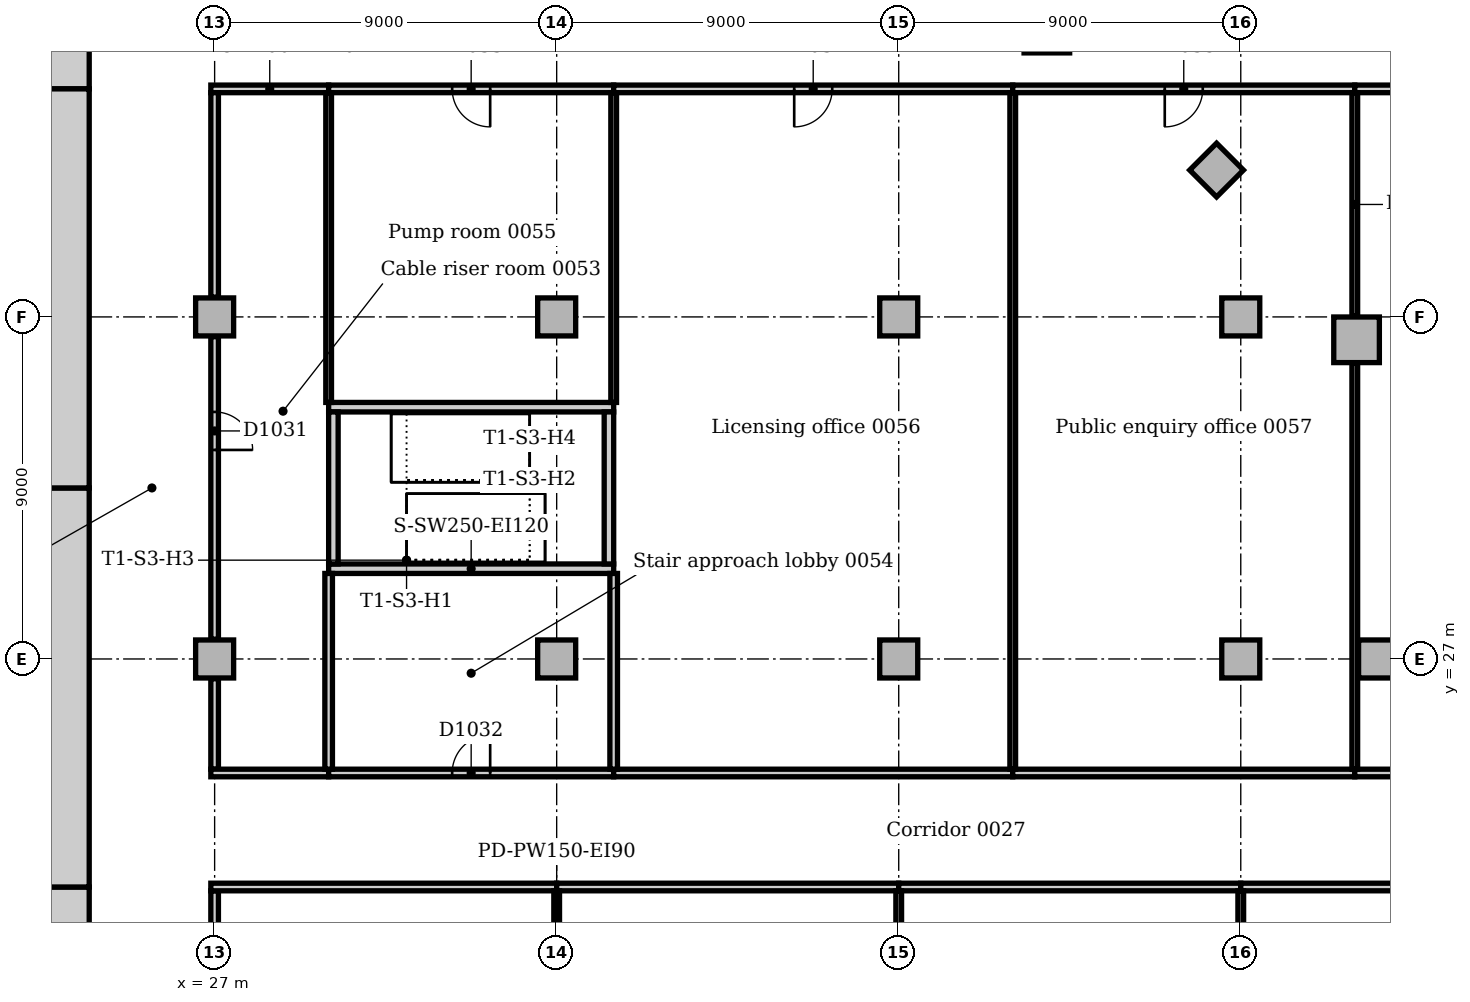
"""IFC4 building model, lengths in metres.
Left out: names, types, materials, properties, quantities, classifications, styles, units other than length and angle.
Written with IfcOpenShell. Run it as: python <this file> out.ifc"""

import sys

from ifc_helpers import new_model, si_unit, direction, frame, frame_2d, origin, origin_2d, place, context, subcontext, project, spatial, rectangle, extrude, element, fill, save


model = new_model("IFC4")
c1 = context("Model", 3, precision=1e-05, world=origin(), true_north=direction((0.0, 1.0)))
c2 = subcontext(c1, "Body", "Model", "MODEL_VIEW")
j1 = project(units=[si_unit("LENGTHUNIT", "METRE"), si_unit("PLANEANGLEUNIT", "RADIAN")], contexts=[c1])
p1 = place(None, origin())
s1 = spatial("IfcSite", under=j1, at=p1, CompositionType="ELEMENT")
p2 = place(p1, origin())
s2 = spatial("IfcBuilding", under=s1, at=p2, CompositionType="ELEMENT")
p3 = place(p2, origin())
s3 = spatial("IfcBuildingStorey", under=s2, at=p3, CompositionType="ELEMENT", Elevation=0.0)
for number, where, z_axis, x_axis in (
    (1, (3.9, 20.4, 0.0), (0.0, 0.0, 1.0), (1.0, 0.0, 0.0)),
    (2, (23.7, 42.6, 0.0), (0.0, 0.0, 1.0), (-1.0, 0.0, 0.0)),
):
    element("IfcWall", number, at=place(p3, frame(where, z_axis=z_axis, x_axis=x_axis)), inside=s3, PredefinedType="SOLIDWALL", context=c2, shape_type="SweptSolid", body=[
        extrude(rectangle(XDim=19.8, YDim=1.2, at=frame_2d((9.9, 0.0))), origin(), (0.0, 0.0, 1.0), 6.0),
    ])
p4 = place(p3, frame((23.1, 21.0, 0.0), z_axis=(0.0, 0.0, 1.0), x_axis=(0.0, 1.0, 0.0)))
e3 = element("IfcWall", 3, at=p4, inside=s3, PredefinedType="SOLIDWALL", context=c2, shape_type="SweptSolid", body=[
    extrude(rectangle(XDim=10.5, YDim=1.2, at=frame_2d((5.25, 0.0))), origin(), (0.0, 0.0, 1.0), 6.0),
])
p5 = place(p4, frame((4.35, 0.0, 0.0)))
e4 = element("IfcOpeningElement", 4, at=p5, cuts=e3, PredefinedType="OPENING", context=c2, shape_type="SweptSolid", body=[
    extrude(rectangle(XDim=1.8, YDim=2.1, at=frame_2d((0.9, 1.05))), frame((0.0, 0.61, 0.0), z_axis=(0.0, -1.0, 0.0), x_axis=(1.0, 0.0, 0.0)), (0.0, 0.0, 1.0), 1.22),
])
p6 = place(p3, frame((23.1, 31.5, 0.0), z_axis=(0.0, 0.0, 1.0), x_axis=(0.0, 1.0, 0.0)))
e5 = element("IfcWall", 5, at=p6, inside=s3, PredefinedType="SOLIDWALL", context=c2, shape_type="SweptSolid", body=[
    extrude(rectangle(XDim=10.5, YDim=1.2, at=frame_2d((5.25, 0.0))), origin(), (0.0, 0.0, 1.0), 6.0),
])
p7 = place(p6, frame((3.15, 0.0, 0.0)))
e6 = element("IfcOpeningElement", 6, at=p7, cuts=e5, PredefinedType="OPENING", context=c2, shape_type="SweptSolid", body=[
    extrude(rectangle(XDim=1.0, YDim=2.1, at=frame_2d((0.5, 1.05))), frame((0.0, 0.61, 0.0), z_axis=(0.0, -1.0, 0.0), x_axis=(1.0, 0.0, 0.0)), (0.0, 0.0, 1.0), 1.22),
])
p8 = place(p6, frame((5.2, 0.0, 0.0)))
e7 = element("IfcOpeningElement", 7, at=p8, cuts=e5, PredefinedType="OPENING", context=c2, shape_type="SweptSolid", body=[
    extrude(rectangle(XDim=1.0, YDim=2.1, at=frame_2d((0.5, 1.05))), frame((0.0, 0.61, 0.0), z_axis=(0.0, -1.0, 0.0), x_axis=(1.0, 0.0, 0.0)), (0.0, 0.0, 1.0), 1.22),
])
for number, where, z_axis, x_axis in (
    (8, (30.0, 29.375, 0.0), (0.0, 0.0, 1.0), (1.0, 0.0, 0.0)),
    (9, (37.5, 33.625, 0.0), (0.0, 0.0, 1.0), (-1.0, 0.0, 0.0)),
):
    element("IfcWall", number, at=place(p3, frame(where, z_axis=z_axis, x_axis=x_axis)), inside=s3, PredefinedType="SOLIDWALL", context=c2, shape_type="SweptSolid", body=[
        extrude(rectangle(XDim=7.5, YDim=0.25, at=frame_2d((3.75, 0.0))), origin(), (0.0, 0.0, 1.0), 6.0),
    ])
for number, where, z_axis, x_axis in (
    (10, (37.375, 29.5, 0.0), (0.0, 0.0, 1.0), (0.0, 1.0, 0.0)),
    (11, (30.125, 33.5, 0.0), (0.0, 0.0, 1.0), (0.0, -1.0, 0.0)),
):
    element("IfcWall", number, at=place(p3, frame(where, z_axis=z_axis, x_axis=x_axis)), inside=s3, PredefinedType="SOLIDWALL", context=c2, shape_type="SweptSolid", body=[
        extrude(rectangle(XDim=4.0, YDim=0.25, at=frame_2d((2.0, 0.0))), origin(), (0.0, 0.0, 1.0), 6.0),
    ])
for number, where, z_axis, x_axis in (
    (12, (57.047, 35.398, 0.0), (0.0, 0.0, 1.0), (1.0, 0.0, 0.0)),
    (13, (48.898, 43.547, 0.0), (0.0, 0.0, 1.0), (1.0, 0.0, 0.0)),
):
    element("IfcColumn", number, at=place(p3, frame(where, z_axis=z_axis, x_axis=x_axis)), inside=s3, PredefinedType="COLUMN", context=c2, shape_type="SweptSolid", body=[
        extrude(rectangle(XDim=1.2, YDim=1.2, at=origin_2d()), origin(), (0.0, 0.0, 1.0), 5.7),
    ])
for number, where, z_axis, x_axis in (
    (14, (57.6, 27.0, 0.0), (0.0, 0.0, 1.0), (1.0, 0.0, 0.0)),
    (15, (53.364, 39.864, 0.0), (0.0, 0.0, 1.0), (0.707, 0.707, 0.0)),
    (16, (27.0, 27.0, 0.0), (0.0, 0.0, 1.0), (1.0, 0.0, 0.0)),
    (17, (27.0, 36.0, 0.0), (0.0, 0.0, 1.0), (1.0, 0.0, 0.0)),
    (18, (36.0, 27.0, 0.0), (0.0, 0.0, 1.0), (1.0, 0.0, 0.0)),
    (19, (36.0, 36.0, 0.0), (0.0, 0.0, 1.0), (1.0, 0.0, 0.0)),
    (20, (45.0, 27.0, 0.0), (0.0, 0.0, 1.0), (1.0, 0.0, 0.0)),
    (21, (45.0, 36.0, 0.0), (0.0, 0.0, 1.0), (1.0, 0.0, 0.0)),
    (22, (54.0, 27.0, 0.0), (0.0, 0.0, 1.0), (1.0, 0.0, 0.0)),
    (23, (54.0, 36.0, 0.0), (0.0, 0.0, 1.0), (1.0, 0.0, 0.0)),
):
    element("IfcColumn", number, at=place(p3, frame(where, z_axis=z_axis, x_axis=x_axis)), inside=s3, PredefinedType="COLUMN", context=c2, shape_type="SweptSolid", body=[
        extrude(rectangle(XDim=1.0, YDim=1.0, at=origin_2d()), origin(), (0.0, 0.0, 1.0), 5.7),
    ])
p9 = place(p3, frame((26.9, 42.0, 0.0), z_axis=(0.0, 0.0, 1.0), x_axis=(1.0, 0.0, 0.0)))
e24 = element("IfcWall", 24, at=p9, inside=s3, PredefinedType="PARTITIONING", context=c2, shape_type="SweptSolid", body=[
    extrude(rectangle(XDim=3.1, YDim=0.2, at=frame_2d((1.55, 0.0))), origin(), (0.0, 0.0, 1.0), 5.7),
])
p10 = place(p3, frame((30.0, 42.0, 0.0), z_axis=(0.0, 0.0, 1.0), x_axis=(1.0, 0.0, 0.0)))
e25 = element("IfcWall", 25, at=p10, inside=s3, PredefinedType="PARTITIONING", context=c2, shape_type="SweptSolid", body=[
    extrude(rectangle(XDim=7.5, YDim=0.2, at=frame_2d((3.75, 0.0))), origin(), (0.0, 0.0, 1.0), 5.7),
])
p11 = place(p10, frame((3.25, 0.0, 0.0)))
e26 = element("IfcOpeningElement", 26, at=p11, cuts=e25, PredefinedType="OPENING", context=c2, shape_type="SweptSolid", body=[
    extrude(rectangle(XDim=1.0, YDim=2.1, at=frame_2d((0.5, 1.05))), frame((0.0, 0.11, 0.0), z_axis=(0.0, -1.0, 0.0), x_axis=(1.0, 0.0, 0.0)), (0.0, 0.0, 1.0), 0.22),
])
p12 = place(p3, frame((37.5, 42.0, 0.0), z_axis=(0.0, 0.0, 1.0), x_axis=(1.0, 0.0, 0.0)))
e27 = element("IfcWall", 27, at=p12, inside=s3, PredefinedType="PARTITIONING", context=c2, shape_type="SweptSolid", body=[
    extrude(rectangle(XDim=10.5, YDim=0.2, at=frame_2d((5.25, 0.0))), origin(), (0.0, 0.0, 1.0), 5.7),
])
p13 = place(p12, frame((4.75, 0.0, 0.0)))
e28 = element("IfcOpeningElement", 28, at=p13, cuts=e27, PredefinedType="OPENING", context=c2, shape_type="SweptSolid", body=[
    extrude(rectangle(XDim=1.0, YDim=2.1, at=frame_2d((0.5, 1.05))), frame((0.0, 0.11, 0.0), z_axis=(0.0, -1.0, 0.0), x_axis=(1.0, 0.0, 0.0)), (0.0, 0.0, 1.0), 0.22),
])
p14 = place(p3, frame((48.0, 42.0, 0.0), z_axis=(0.0, 0.0, 1.0), x_axis=(1.0, 0.0, 0.0)))
e29 = element("IfcWall", 29, at=p14, inside=s3, PredefinedType="PARTITIONING", context=c2, shape_type="SweptSolid", body=[
    extrude(rectangle(XDim=9.0, YDim=0.2, at=frame_2d((4.5, 0.0))), origin(), (0.0, 0.0, 1.0), 5.7),
])
p15 = place(p14, frame((4.0, 0.0, 0.0)))
e30 = element("IfcOpeningElement", 30, at=p15, cuts=e29, PredefinedType="OPENING", context=c2, shape_type="SweptSolid", body=[
    extrude(rectangle(XDim=1.0, YDim=2.1, at=frame_2d((0.5, 1.05))), frame((0.0, 0.11, 0.0), z_axis=(0.0, -1.0, 0.0), x_axis=(1.0, 0.0, 0.0)), (0.0, 0.0, 1.0), 0.22),
])
p16 = place(p3, frame((57.0, 42.0, 0.0), z_axis=(0.0, 0.0, 1.0), x_axis=(1.0, 0.0, 0.0)))
e31 = element("IfcWall", 31, at=p16, inside=s3, PredefinedType="PARTITIONING", context=c2, shape_type="SweptSolid", body=[
    extrude(rectangle(XDim=8.6, YDim=0.2, at=frame_2d((4.3, 0.0))), origin(), (0.0, 0.0, 1.0), 5.7),
])
p17 = place(p16, frame((4.0, 0.0, 0.0)))
e32 = element("IfcOpeningElement", 32, at=p17, cuts=e31, PredefinedType="OPENING", context=c2, shape_type="SweptSolid", body=[
    extrude(rectangle(XDim=1.0, YDim=2.1, at=frame_2d((0.5, 1.05))), frame((0.0, 0.11, 0.0), z_axis=(0.0, -1.0, 0.0), x_axis=(1.0, 0.0, 0.0)), (0.0, 0.0, 1.0), 0.22),
])
for number, where, z_axis, x_axis in (
    (33, (27.0, 18.52, 0.0), (0.0, 0.0, 1.0), (0.0, 1.0, 0.0)),
    (34, (27.0, 24.1, 0.0), (0.0, 0.0, 1.0), (0.0, 1.0, 0.0)),
):
    element("IfcWall", number, at=place(p3, frame(where, z_axis=z_axis, x_axis=x_axis)), inside=s3, PredefinedType="PARTITIONING", context=c2, shape_type="SweptSolid", body=[
        extrude(rectangle(XDim=2.38, YDim=0.2, at=frame_2d((1.19, 0.0))), origin(), (0.0, 0.0, 1.0), 5.7),
    ])
p18 = place(p3, frame((27.0, 27.52, 0.0), z_axis=(0.0, 0.0, 1.0), x_axis=(0.0, 1.0, 0.0)))
e35 = element("IfcWall", 35, at=p18, inside=s3, PredefinedType="PARTITIONING", context=c2, shape_type="SweptSolid", body=[
    extrude(rectangle(XDim=7.96, YDim=0.2, at=frame_2d((3.98, 0.0))), origin(), (0.0, 0.0, 1.0), 5.7),
])
p19 = place(p18, frame((4.98, 0.0, 0.0)))
e36 = element("IfcOpeningElement", 36, at=p19, cuts=e35, PredefinedType="OPENING", context=c2, shape_type="SweptSolid", body=[
    extrude(rectangle(XDim=1.0, YDim=2.1, at=frame_2d((0.5, 1.05))), frame((0.0, 0.11, 0.0), z_axis=(0.0, -1.0, 0.0), x_axis=(1.0, 0.0, 0.0)), (0.0, 0.0, 1.0), 0.22),
])
p20 = place(p3, frame((27.0, 36.52, 0.0), z_axis=(0.0, 0.0, 1.0), x_axis=(0.0, 1.0, 0.0)))
e37 = element("IfcWall", 37, at=p20, inside=s3, PredefinedType="PARTITIONING", context=c2, shape_type="SweptSolid", body=[
    extrude(rectangle(XDim=5.38, YDim=0.2, at=frame_2d((2.69, 0.0))), origin(), (0.0, 0.0, 1.0), 5.7),
])
p21 = place(p3, frame((26.9, 21.0, 0.0), z_axis=(0.0, 0.0, 1.0), x_axis=(1.0, 0.0, 0.0)))
e38 = element("IfcWall", 38, at=p21, inside=s3, PredefinedType="PARTITIONING", context=c2, shape_type="SweptSolid", body=[
    extrude(rectangle(XDim=9.1, YDim=0.2, at=frame_2d((4.55, 0.0))), origin(), (0.0, 0.0, 1.0), 5.7),
])
for number, where, z_axis, x_axis in (
    (39, (36.0, 21.0, 0.0), (0.0, 0.0, 1.0), (1.0, 0.0, 0.0)),
    (40, (45.0, 21.0, 0.0), (0.0, 0.0, 1.0), (1.0, 0.0, 0.0)),
):
    element("IfcWall", number, at=place(p3, frame(where, z_axis=z_axis, x_axis=x_axis)), inside=s3, PredefinedType="PARTITIONING", context=c2, shape_type="SweptSolid", body=[
        extrude(rectangle(XDim=9.0, YDim=0.2, at=frame_2d((4.5, 0.0))), origin(), (0.0, 0.0, 1.0), 5.7),
    ])
p22 = place(p3, frame((54.0, 21.0, 0.0), z_axis=(0.0, 0.0, 1.0), x_axis=(1.0, 0.0, 0.0)))
e41 = element("IfcWall", 41, at=p22, inside=s3, PredefinedType="PARTITIONING", context=c2, shape_type="SweptSolid", body=[
    extrude(rectangle(XDim=12.0, YDim=0.2, at=frame_2d((6.0, 0.0))), origin(), (0.0, 0.0, 1.0), 5.7),
])
p23 = place(p3, frame((26.9, 24.0, 0.0), z_axis=(0.0, 0.0, 1.0), x_axis=(1.0, 0.0, 0.0)))
e42 = element("IfcWall", 42, at=p23, inside=s3, PredefinedType="PARTITIONING", context=c2, shape_type="SweptSolid", body=[
    extrude(rectangle(XDim=3.1, YDim=0.2, at=frame_2d((1.55, 0.0))), origin(), (0.0, 0.0, 1.0), 5.7),
])
p24 = place(p3, frame((30.0, 24.0, 0.0), z_axis=(0.0, 0.0, 1.0), x_axis=(1.0, 0.0, 0.0)))
e43 = element("IfcWall", 43, at=p24, inside=s3, PredefinedType="PARTITIONING", context=c2, shape_type="SweptSolid", body=[
    extrude(rectangle(XDim=7.5, YDim=0.2, at=frame_2d((3.75, 0.0))), origin(), (0.0, 0.0, 1.0), 5.7),
])
p25 = place(p24, frame((3.25, 0.0, 0.0)))
e44 = element("IfcOpeningElement", 44, at=p25, cuts=e43, PredefinedType="OPENING", context=c2, shape_type="SweptSolid", body=[
    extrude(rectangle(XDim=1.0, YDim=2.1, at=frame_2d((0.5, 1.05))), frame((0.0, 0.11, 0.0), z_axis=(0.0, -1.0, 0.0), x_axis=(1.0, 0.0, 0.0)), (0.0, 0.0, 1.0), 0.22),
])
p26 = place(p3, frame((37.5, 24.0, 0.0), z_axis=(0.0, 0.0, 1.0), x_axis=(1.0, 0.0, 0.0)))
e45 = element("IfcWall", 45, at=p26, inside=s3, PredefinedType="PARTITIONING", context=c2, shape_type="SweptSolid", body=[
    extrude(rectangle(XDim=10.5, YDim=0.2, at=frame_2d((5.25, 0.0))), origin(), (0.0, 0.0, 1.0), 5.7),
])
for number, where, z_axis, x_axis in (
    (46, (48.0, 24.0, 0.0), (0.0, 0.0, 1.0), (1.0, 0.0, 0.0)),
    (47, (57.0, 24.0, 0.0), (0.0, 0.0, 1.0), (1.0, 0.0, 0.0)),
):
    element("IfcWall", number, at=place(p3, frame(where, z_axis=z_axis, x_axis=x_axis)), inside=s3, PredefinedType="PARTITIONING", context=c2, shape_type="SweptSolid", body=[
        extrude(rectangle(XDim=9.0, YDim=0.2, at=frame_2d((4.5, 0.0))), origin(), (0.0, 0.0, 1.0), 5.7),
    ])
for number, where, z_axis, x_axis in (
    (48, (36.0, 18.52, 0.0), (0.0, 0.0, 1.0), (0.0, 1.0, 0.0)),
    (49, (45.0, 18.52, 0.0), (0.0, 0.0, 1.0), (0.0, 1.0, 0.0)),
    (50, (54.0, 18.52, 0.0), (0.0, 0.0, 1.0), (0.0, 1.0, 0.0)),
):
    element("IfcWall", number, at=place(p3, frame(where, z_axis=z_axis, x_axis=x_axis)), inside=s3, PredefinedType="PARTITIONING", context=c2, shape_type="SweptSolid", body=[
        extrude(rectangle(XDim=2.38, YDim=0.15, at=frame_2d((1.19, 0.0))), origin(), (0.0, 0.0, 1.0), 5.7),
    ])
p27 = place(p3, frame((30.0, 24.1, 0.0), z_axis=(0.0, 0.0, 1.0), x_axis=(0.0, 1.0, 0.0)))
e51 = element("IfcWall", 51, at=p27, inside=s3, PredefinedType="PARTITIONING", context=c2, shape_type="SweptSolid", body=[
    extrude(rectangle(XDim=5.15, YDim=0.2, at=frame_2d((2.575, 0.0))), origin(), (0.0, 0.0, 1.0), 5.7),
])
p28 = place(p3, frame((30.0, 33.75, 0.0), z_axis=(0.0, 0.0, 1.0), x_axis=(0.0, 1.0, 0.0)))
e52 = element("IfcWall", 52, at=p28, inside=s3, PredefinedType="PARTITIONING", context=c2, shape_type="SweptSolid", body=[
    extrude(rectangle(XDim=8.15, YDim=0.15, at=frame_2d((4.075, 0.0))), origin(), (0.0, 0.0, 1.0), 5.7),
])
p29 = place(p3, frame((37.5, 24.1, 0.0), z_axis=(0.0, 0.0, 1.0), x_axis=(0.0, 1.0, 0.0)))
e53 = element("IfcWall", 53, at=p29, inside=s3, PredefinedType="PARTITIONING", context=c2, shape_type="SweptSolid", body=[
    extrude(rectangle(XDim=5.15, YDim=0.2, at=frame_2d((2.575, 0.0))), origin(), (0.0, 0.0, 1.0), 5.7),
])
p30 = place(p3, frame((37.5, 33.75, 0.0), z_axis=(0.0, 0.0, 1.0), x_axis=(0.0, 1.0, 0.0)))
e54 = element("IfcWall", 54, at=p30, inside=s3, PredefinedType="PARTITIONING", context=c2, shape_type="SweptSolid", body=[
    extrude(rectangle(XDim=8.15, YDim=0.15, at=frame_2d((4.075, 0.0))), origin(), (0.0, 0.0, 1.0), 5.7),
])
p31 = place(p3, frame((48.0, 24.1, 0.0), z_axis=(0.0, 0.0, 1.0), x_axis=(0.0, 1.0, 0.0)))
e55 = element("IfcWall", 55, at=p31, inside=s3, PredefinedType="PARTITIONING", context=c2, shape_type="SweptSolid", body=[
    extrude(rectangle(XDim=17.8, YDim=0.15, at=frame_2d((8.9, 0.0))), origin(), (0.0, 0.0, 1.0), 5.7),
])
p32 = place(p3, frame((57.0, 24.1, 0.0), z_axis=(0.0, 0.0, 1.0), x_axis=(0.0, 1.0, 0.0)))
e56 = element("IfcWall", 56, at=p32, inside=s3, PredefinedType="PARTITIONING", context=c2, shape_type="SweptSolid", body=[
    extrude(rectangle(XDim=10.678, YDim=0.15, at=frame_2d((5.339, 0.0))), origin(), (0.0, 0.0, 1.0), 5.7),
])
p33 = place(p3, frame((57.0, 36.018, 0.0), z_axis=(0.0, 0.0, 1.0), x_axis=(0.0, 1.0, 0.0)))
e57 = element("IfcWall", 57, at=p33, inside=s3, PredefinedType="PARTITIONING", context=c2, shape_type="SweptSolid", body=[
    extrude(rectangle(XDim=5.882, YDim=0.15, at=frame_2d((2.941, 0.0))), origin(), (0.0, 0.0, 1.0), 5.7),
])
p34 = place(p19, frame((1.0, 0.0, 0.0), z_axis=(0.0, 0.0, 1.0), x_axis=(-1.0, 0.0, 0.0)))
e58 = element("IfcDoor", 58, at=p34, inside=s3, OperationType="SINGLE_SWING_RIGHT", PredefinedType="DOOR", context=c2, shape_type="SweptSolid", body=[
    extrude(rectangle(XDim=1.0, YDim=2.1, at=frame_2d((0.5, 1.05))), frame((0.0, 0.025, 0.0), z_axis=(0.0, -1.0, 0.0), x_axis=(1.0, 0.0, 0.0)), (0.0, 0.0, 1.0), 0.05),
])
fill(e36, e58)
p35 = place(p25, origin())
e59 = element("IfcDoor", 59, at=p35, inside=s3, OperationType="SINGLE_SWING_RIGHT", PredefinedType="DOOR", context=c2, shape_type="SweptSolid", body=[
    extrude(rectangle(XDim=1.0, YDim=2.1, at=frame_2d((0.5, 1.05))), frame((0.0, 0.025, 0.0), z_axis=(0.0, -1.0, 0.0), x_axis=(1.0, 0.0, 0.0)), (0.0, 0.0, 1.0), 0.05),
])
fill(e44, e59)
p36 = place(p11, frame((1.0, 0.0, 0.0), z_axis=(0.0, 0.0, 1.0), x_axis=(-1.0, 0.0, 0.0)))
e60 = element("IfcDoor", 60, at=p36, inside=s3, OperationType="SINGLE_SWING_LEFT", PredefinedType="DOOR", context=c2, shape_type="SweptSolid", body=[
    extrude(rectangle(XDim=1.0, YDim=2.1, at=frame_2d((0.5, 1.05))), frame((0.0, 0.025, 0.0), z_axis=(0.0, -1.0, 0.0), x_axis=(1.0, 0.0, 0.0)), (0.0, 0.0, 1.0), 0.05),
])
fill(e26, e60)
p37 = place(p13, frame((1.0, 0.0, 0.0), z_axis=(0.0, 0.0, 1.0), x_axis=(-1.0, 0.0, 0.0)))
e61 = element("IfcDoor", 61, at=p37, inside=s3, OperationType="SINGLE_SWING_RIGHT", PredefinedType="DOOR", context=c2, shape_type="SweptSolid", body=[
    extrude(rectangle(XDim=1.0, YDim=2.1, at=frame_2d((0.5, 1.05))), frame((0.0, 0.025, 0.0), z_axis=(0.0, -1.0, 0.0), x_axis=(1.0, 0.0, 0.0)), (0.0, 0.0, 1.0), 0.05),
])
fill(e28, e61)
p38 = place(p15, frame((1.0, 0.0, 0.0), z_axis=(0.0, 0.0, 1.0), x_axis=(-1.0, 0.0, 0.0)))
e62 = element("IfcDoor", 62, at=p38, inside=s3, OperationType="SINGLE_SWING_RIGHT", PredefinedType="DOOR", context=c2, shape_type="SweptSolid", body=[
    extrude(rectangle(XDim=1.0, YDim=2.1, at=frame_2d((0.5, 1.05))), frame((0.0, 0.025, 0.0), z_axis=(0.0, -1.0, 0.0), x_axis=(1.0, 0.0, 0.0)), (0.0, 0.0, 1.0), 0.05),
])
fill(e30, e62)
p39 = place(p5, origin())
e63 = element("IfcDoor", 63, at=p39, inside=s3, OperationType="DOUBLE_DOOR_DOUBLE_SWING", PredefinedType="DOOR", context=c2, shape_type="SweptSolid", body=[
    extrude(rectangle(XDim=1.8, YDim=2.1, at=frame_2d((0.9, 1.05))), frame((0.0, 0.025, 0.0), z_axis=(0.0, -1.0, 0.0), x_axis=(1.0, 0.0, 0.0)), (0.0, 0.0, 1.0), 0.05),
])
fill(e4, e63)
p40 = place(p7, frame((1.0, 0.0, 0.0), z_axis=(0.0, 0.0, 1.0), x_axis=(-1.0, 0.0, 0.0)))
e64 = element("IfcDoor", 64, at=p40, inside=s3, OperationType="SINGLE_SWING_LEFT", PredefinedType="DOOR", context=c2, shape_type="SweptSolid", body=[
    extrude(rectangle(XDim=1.0, YDim=2.1, at=frame_2d((0.5, 1.05))), frame((0.0, 0.025, 0.0), z_axis=(0.0, -1.0, 0.0), x_axis=(1.0, 0.0, 0.0)), (0.0, 0.0, 1.0), 0.05),
])
fill(e6, e64)
p41 = place(p8, frame((1.0, 0.0, 0.0), z_axis=(0.0, 0.0, 1.0), x_axis=(-1.0, 0.0, 0.0)))
e65 = element("IfcDoor", 65, at=p41, inside=s3, OperationType="SINGLE_SWING_RIGHT", PredefinedType="DOOR", context=c2, shape_type="SweptSolid", body=[
    extrude(rectangle(XDim=1.0, YDim=2.1, at=frame_2d((0.5, 1.05))), frame((0.0, 0.025, 0.0), z_axis=(0.0, -1.0, 0.0), x_axis=(1.0, 0.0, 0.0)), (0.0, 0.0, 1.0), 0.05),
])
fill(e7, e65)
save(model, sys.argv[1])
